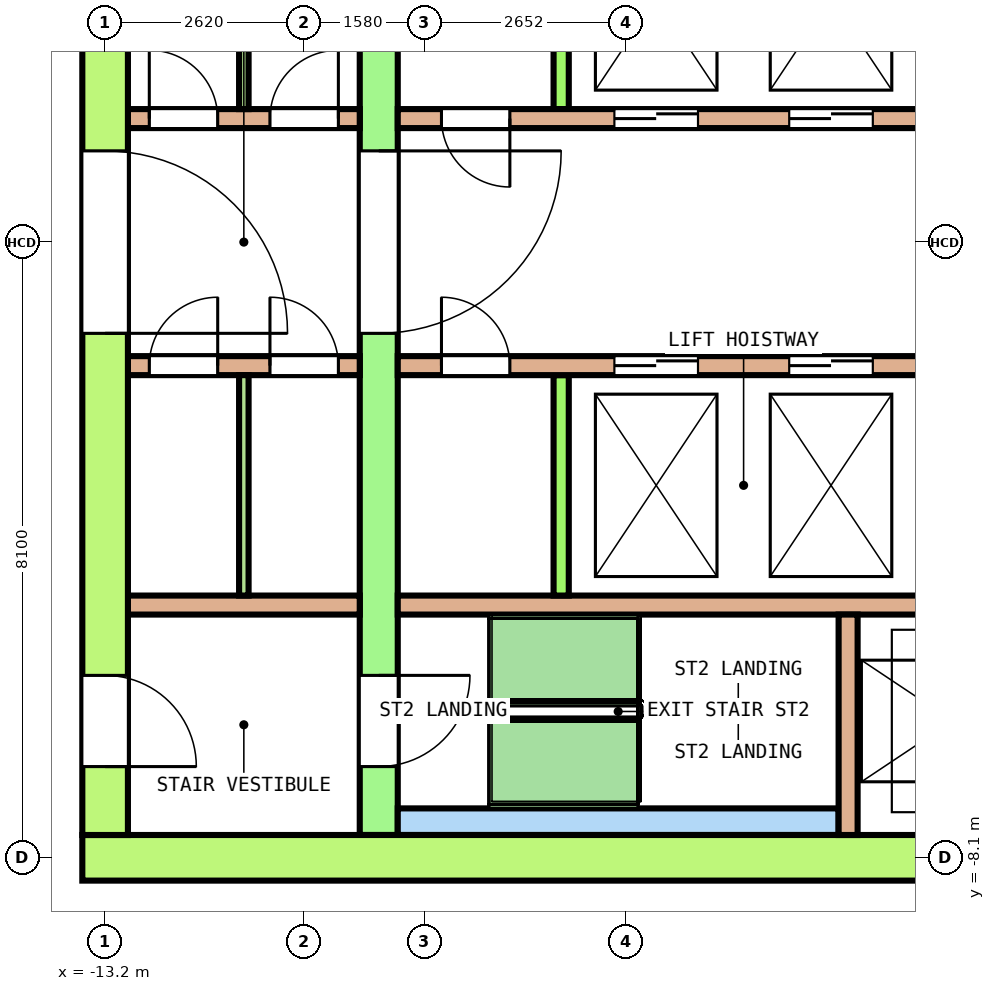
"""IFC4 building model, lengths in metres.
Left out: names, types, materials, properties, quantities, classifications, styles, units other than length and angle.
Written with IfcOpenShell. Run it as: python <this file> out.ifc"""

import sys

from ifc_helpers import new_model, si_unit, direction, frame, frame_2d, origin, place, context, subcontext, project, spatial, rectangle, extrude, element, fill, save


model = new_model("IFC4")
c1 = context("Model", 3, precision=1e-05, world=origin(), true_north=direction((0.0, 1.0)))
c2 = subcontext(c1, "Body", "Model", "MODEL_VIEW")
j1 = project(units=[si_unit("LENGTHUNIT", "METRE"), si_unit("PLANEANGLEUNIT", "RADIAN")], contexts=[c1])
p1 = place(None, origin())
s1 = spatial("IfcSite", under=j1, at=p1, CompositionType="ELEMENT")
p2 = place(p1, origin())
s2 = spatial("IfcBuilding", under=s1, at=p2, CompositionType="ELEMENT")
p3 = place(p2, frame((0.0, 0.0, 231.4)))
s3 = spatial("IfcBuildingStorey", under=s2, at=p3, CompositionType="ELEMENT", Elevation=231.4)
p4 = place(p3, frame((-13.5, -8.1, 0.0), z_axis=(0.0, 0.0, 1.0), x_axis=(1.0, 0.0, 0.0)))
e1 = element("IfcWall", 1, at=p4, inside=s3, PredefinedType="SHEAR", context=c2, shape_type="SweptSolid", body=[
    extrude(rectangle(XDim=27.0, YDim=0.6, at=frame_2d((13.5, 0.0))), origin(), (0.0, 0.0, 1.0), 5.7),
])
p5 = place(p4, frame((15.05, 0.0, 0.0)))
e2 = element("IfcOpeningElement", 2, at=p5, cuts=e1, PredefinedType="OPENING", context=c2, shape_type="SweptSolid", body=[
    extrude(rectangle(XDim=1.2, YDim=2.1, at=frame_2d((0.6, 1.05))), frame((0.0, 0.31, 0.0), z_axis=(0.0, -1.0, 0.0), x_axis=(1.0, 0.0, 0.0)), (0.0, 0.0, 1.0), 0.62),
])
p6 = place(p3, frame((-13.2, -7.8, 0.0), z_axis=(0.0, 0.0, 1.0), x_axis=(0.0, 1.0, 0.0)))
e3 = element("IfcWall", 3, at=p6, inside=s3, PredefinedType="SHEAR", context=c2, shape_type="SweptSolid", body=[
    extrude(rectangle(XDim=15.6, YDim=0.6, at=frame_2d((7.8, 0.0))), origin(), (0.0, 0.0, 1.0), 5.7),
])
p7 = place(p6, frame((6.6, 0.0, 0.0)))
e4 = element("IfcOpeningElement", 4, at=p7, cuts=e3, PredefinedType="OPENING", context=c2, shape_type="SweptSolid", body=[
    extrude(rectangle(XDim=2.4, YDim=2.1, at=frame_2d((1.2, 1.05))), frame((0.0, 0.31, 0.0), z_axis=(0.0, -1.0, 0.0), x_axis=(1.0, 0.0, 0.0)), (0.0, 0.0, 1.0), 0.62),
])
p8 = place(p6, frame((13.5, 0.0, 0.0)))
e5 = element("IfcOpeningElement", 5, at=p8, cuts=e3, PredefinedType="OPENING", context=c2, shape_type="SweptSolid", body=[
    extrude(rectangle(XDim=1.2, YDim=2.1, at=frame_2d((0.6, 1.05))), frame((0.0, 0.31, 0.0), z_axis=(0.0, -1.0, 0.0), x_axis=(1.0, 0.0, 0.0)), (0.0, 0.0, 1.0), 0.62),
])
p9 = place(p6, frame((0.9, 0.0, 0.0)))
e6 = element("IfcOpeningElement", 6, at=p9, cuts=e3, PredefinedType="OPENING", context=c2, shape_type="SweptSolid", body=[
    extrude(rectangle(XDim=1.2, YDim=2.1, at=frame_2d((0.6, 1.05))), frame((0.0, 0.31, 0.0), z_axis=(0.0, -1.0, 0.0), x_axis=(1.0, 0.0, 0.0)), (0.0, 0.0, 1.0), 0.62),
])
p10 = place(p3, frame((-9.6, -7.8, 0.0), z_axis=(0.0, 0.0, 1.0), x_axis=(0.0, 1.0, 0.0)))
e7 = element("IfcWall", 7, at=p10, inside=s3, PredefinedType="SHEAR", context=c2, shape_type="SweptSolid", body=[
    extrude(rectangle(XDim=15.6, YDim=0.5, at=frame_2d((7.8, 0.0))), origin(), (0.0, 0.0, 1.0), 5.7),
])
p11 = place(p10, frame((6.6, 0.0, 0.0)))
e8 = element("IfcOpeningElement", 8, at=p11, cuts=e7, PredefinedType="OPENING", context=c2, shape_type="SweptSolid", body=[
    extrude(rectangle(XDim=2.4, YDim=2.1, at=frame_2d((1.2, 1.05))), frame((0.0, 0.26, 0.0), z_axis=(0.0, -1.0, 0.0), x_axis=(1.0, 0.0, 0.0)), (0.0, 0.0, 1.0), 0.52),
])
p12 = place(p10, frame((13.5, 0.0, 0.0)))
e9 = element("IfcOpeningElement", 9, at=p12, cuts=e7, PredefinedType="OPENING", context=c2, shape_type="SweptSolid", body=[
    extrude(rectangle(XDim=1.2, YDim=2.1, at=frame_2d((0.6, 1.05))), frame((0.0, 0.26, 0.0), z_axis=(0.0, -1.0, 0.0), x_axis=(1.0, 0.0, 0.0)), (0.0, 0.0, 1.0), 0.52),
])
p13 = place(p10, frame((0.9, 0.0, 0.0)))
e10 = element("IfcOpeningElement", 10, at=p13, cuts=e7, PredefinedType="OPENING", context=c2, shape_type="SweptSolid", body=[
    extrude(rectangle(XDim=1.2, YDim=2.1, at=frame_2d((0.6, 1.05))), frame((0.0, 0.26, 0.0), z_axis=(0.0, -1.0, 0.0), x_axis=(1.0, 0.0, 0.0)), (0.0, 0.0, 1.0), 0.52),
])
p14 = place(p3, frame((-12.9, 1.625, 0.0), z_axis=(0.0, 0.0, 1.0), x_axis=(1.0, 0.0, 0.0)))
e11 = element("IfcWall", 11, at=p14, inside=s3, PredefinedType="SOLIDWALL", context=c2, shape_type="SweptSolid", body=[
    extrude(rectangle(XDim=3.05, YDim=0.25, at=frame_2d((1.525, 0.0))), origin(), (0.0, 0.0, 1.0), 5.7),
])
p15 = place(p14, frame((0.281, 0.0, 0.0)))
e12 = element("IfcOpeningElement", 12, at=p15, cuts=e11, PredefinedType="OPENING", context=c2, shape_type="SweptSolid", body=[
    extrude(rectangle(XDim=0.9, YDim=2.1, at=frame_2d((0.45, 1.05))), frame((0.0, 0.135, 0.0), z_axis=(0.0, -1.0, 0.0), x_axis=(1.0, 0.0, 0.0)), (0.0, 0.0, 1.0), 0.27),
])
p16 = place(p14, frame((1.869, 0.0, 0.0)))
e13 = element("IfcOpeningElement", 13, at=p16, cuts=e11, PredefinedType="OPENING", context=c2, shape_type="SweptSolid", body=[
    extrude(rectangle(XDim=0.9, YDim=2.1, at=frame_2d((0.45, 1.05))), frame((0.0, 0.135, 0.0), z_axis=(0.0, -1.0, 0.0), x_axis=(1.0, 0.0, 0.0)), (0.0, 0.0, 1.0), 0.27),
])
p17 = place(p3, frame((-9.35, 1.625, 0.0), z_axis=(0.0, 0.0, 1.0), x_axis=(1.0, 0.0, 0.0)))
e14 = element("IfcWall", 14, at=p17, inside=s3, PredefinedType="SOLIDWALL", context=c2, shape_type="SweptSolid", body=[
    extrude(rectangle(XDim=18.7, YDim=0.25, at=frame_2d((9.35, 0.0))), origin(), (0.0, 0.0, 1.0), 5.7),
])
p18 = place(p17, frame((2.85, 0.0, 0.0)))
e15 = element("IfcOpeningElement", 15, at=p18, cuts=e14, PredefinedType="OPENING", context=c2, shape_type="SweptSolid", body=[
    extrude(rectangle(XDim=1.1, YDim=2.1, at=frame_2d((0.55, 1.05))), frame((0.0, 0.135, 0.0), z_axis=(0.0, -1.0, 0.0), x_axis=(1.0, 0.0, 0.0)), (0.0, 0.0, 1.0), 0.27),
])
p19 = place(p17, frame((5.15, 0.0, 0.0)))
e16 = element("IfcOpeningElement", 16, at=p19, cuts=e14, PredefinedType="OPENING", context=c2, shape_type="SweptSolid", body=[
    extrude(rectangle(XDim=1.1, YDim=2.1, at=frame_2d((0.55, 1.05))), frame((0.0, 0.135, 0.0), z_axis=(0.0, -1.0, 0.0), x_axis=(1.0, 0.0, 0.0)), (0.0, 0.0, 1.0), 0.27),
])
p20 = place(p17, frame((7.65, 0.0, 0.0)))
e17 = element("IfcOpeningElement", 17, at=p20, cuts=e14, PredefinedType="OPENING", context=c2, shape_type="SweptSolid", body=[
    extrude(rectangle(XDim=1.1, YDim=2.1, at=frame_2d((0.55, 1.05))), frame((0.0, 0.135, 0.0), z_axis=(0.0, -1.0, 0.0), x_axis=(1.0, 0.0, 0.0)), (0.0, 0.0, 1.0), 0.27),
])
p21 = place(p17, frame((9.95, 0.0, 0.0)))
e18 = element("IfcOpeningElement", 18, at=p21, cuts=e14, PredefinedType="OPENING", context=c2, shape_type="SweptSolid", body=[
    extrude(rectangle(XDim=1.1, YDim=2.1, at=frame_2d((0.55, 1.05))), frame((0.0, 0.135, 0.0), z_axis=(0.0, -1.0, 0.0), x_axis=(1.0, 0.0, 0.0)), (0.0, 0.0, 1.0), 0.27),
])
p22 = place(p17, frame((12.4, 0.0, 0.0)))
e19 = element("IfcOpeningElement", 19, at=p22, cuts=e14, PredefinedType="OPENING", context=c2, shape_type="SweptSolid", body=[
    extrude(rectangle(XDim=1.1, YDim=2.1, at=frame_2d((0.55, 1.05))), frame((0.0, 0.135, 0.0), z_axis=(0.0, -1.0, 0.0), x_axis=(1.0, 0.0, 0.0)), (0.0, 0.0, 1.0), 0.27),
])
p23 = place(p17, frame((14.8, 0.0, 0.0)))
e20 = element("IfcOpeningElement", 20, at=p23, cuts=e14, PredefinedType="OPENING", context=c2, shape_type="SweptSolid", body=[
    extrude(rectangle(XDim=1.1, YDim=2.1, at=frame_2d((0.55, 1.05))), frame((0.0, 0.135, 0.0), z_axis=(0.0, -1.0, 0.0), x_axis=(1.0, 0.0, 0.0)), (0.0, 0.0, 1.0), 0.27),
])
p24 = place(p17, frame((0.575, 0.0, 0.0)))
e21 = element("IfcOpeningElement", 21, at=p24, cuts=e14, PredefinedType="OPENING", context=c2, shape_type="SweptSolid", body=[
    extrude(rectangle(XDim=0.9, YDim=2.1, at=frame_2d((0.45, 1.05))), frame((0.0, 0.135, 0.0), z_axis=(0.0, -1.0, 0.0), x_axis=(1.0, 0.0, 0.0)), (0.0, 0.0, 1.0), 0.27),
])
p25 = place(p17, frame((17.225, 0.0, 0.0)))
e22 = element("IfcOpeningElement", 22, at=p25, cuts=e14, PredefinedType="OPENING", context=c2, shape_type="SweptSolid", body=[
    extrude(rectangle(XDim=0.9, YDim=2.1, at=frame_2d((0.45, 1.05))), frame((0.0, 0.135, 0.0), z_axis=(0.0, -1.0, 0.0), x_axis=(1.0, 0.0, 0.0)), (0.0, 0.0, 1.0), 0.27),
])
p26 = place(p3, frame((-7.2, 1.75, 0.0), z_axis=(0.0, 0.0, 1.0), x_axis=(0.0, 1.0, 0.0)))
e23 = element("IfcWall", 23, at=p26, inside=s3, PredefinedType="SOLIDWALL", context=c2, shape_type="SweptSolid", body=[
    extrude(rectangle(XDim=2.9, YDim=0.2, at=frame_2d((1.45, 0.0))), origin(), (0.0, 0.0, 1.0), 5.7),
])
p27 = place(p3, frame((-12.9, -1.625, 0.0), z_axis=(0.0, 0.0, 1.0), x_axis=(1.0, 0.0, 0.0)))
e24 = element("IfcWall", 24, at=p27, inside=s3, PredefinedType="SOLIDWALL", context=c2, shape_type="SweptSolid", body=[
    extrude(rectangle(XDim=3.05, YDim=0.25, at=frame_2d((1.525, 0.0))), origin(), (0.0, 0.0, 1.0), 5.7),
])
p28 = place(p27, frame((0.281, 0.0, 0.0)))
e25 = element("IfcOpeningElement", 25, at=p28, cuts=e24, PredefinedType="OPENING", context=c2, shape_type="SweptSolid", body=[
    extrude(rectangle(XDim=0.9, YDim=2.1, at=frame_2d((0.45, 1.05))), frame((0.0, 0.135, 0.0), z_axis=(0.0, -1.0, 0.0), x_axis=(1.0, 0.0, 0.0)), (0.0, 0.0, 1.0), 0.27),
])
p29 = place(p27, frame((1.869, 0.0, 0.0)))
e26 = element("IfcOpeningElement", 26, at=p29, cuts=e24, PredefinedType="OPENING", context=c2, shape_type="SweptSolid", body=[
    extrude(rectangle(XDim=0.9, YDim=2.1, at=frame_2d((0.45, 1.05))), frame((0.0, 0.135, 0.0), z_axis=(0.0, -1.0, 0.0), x_axis=(1.0, 0.0, 0.0)), (0.0, 0.0, 1.0), 0.27),
])
p30 = place(p3, frame((-9.35, -1.625, 0.0), z_axis=(0.0, 0.0, 1.0), x_axis=(1.0, 0.0, 0.0)))
e27 = element("IfcWall", 27, at=p30, inside=s3, PredefinedType="SOLIDWALL", context=c2, shape_type="SweptSolid", body=[
    extrude(rectangle(XDim=18.7, YDim=0.25, at=frame_2d((9.35, 0.0))), origin(), (0.0, 0.0, 1.0), 5.7),
])
p31 = place(p30, frame((2.85, 0.0, 0.0)))
e28 = element("IfcOpeningElement", 28, at=p31, cuts=e27, PredefinedType="OPENING", context=c2, shape_type="SweptSolid", body=[
    extrude(rectangle(XDim=1.1, YDim=2.1, at=frame_2d((0.55, 1.05))), frame((0.0, 0.135, 0.0), z_axis=(0.0, -1.0, 0.0), x_axis=(1.0, 0.0, 0.0)), (0.0, 0.0, 1.0), 0.27),
])
p32 = place(p30, frame((5.15, 0.0, 0.0)))
e29 = element("IfcOpeningElement", 29, at=p32, cuts=e27, PredefinedType="OPENING", context=c2, shape_type="SweptSolid", body=[
    extrude(rectangle(XDim=1.1, YDim=2.1, at=frame_2d((0.55, 1.05))), frame((0.0, 0.135, 0.0), z_axis=(0.0, -1.0, 0.0), x_axis=(1.0, 0.0, 0.0)), (0.0, 0.0, 1.0), 0.27),
])
p33 = place(p30, frame((7.65, 0.0, 0.0)))
e30 = element("IfcOpeningElement", 30, at=p33, cuts=e27, PredefinedType="OPENING", context=c2, shape_type="SweptSolid", body=[
    extrude(rectangle(XDim=1.1, YDim=2.1, at=frame_2d((0.55, 1.05))), frame((0.0, 0.135, 0.0), z_axis=(0.0, -1.0, 0.0), x_axis=(1.0, 0.0, 0.0)), (0.0, 0.0, 1.0), 0.27),
])
p34 = place(p30, frame((9.95, 0.0, 0.0)))
e31 = element("IfcOpeningElement", 31, at=p34, cuts=e27, PredefinedType="OPENING", context=c2, shape_type="SweptSolid", body=[
    extrude(rectangle(XDim=1.1, YDim=2.1, at=frame_2d((0.55, 1.05))), frame((0.0, 0.135, 0.0), z_axis=(0.0, -1.0, 0.0), x_axis=(1.0, 0.0, 0.0)), (0.0, 0.0, 1.0), 0.27),
])
p35 = place(p30, frame((12.4, 0.0, 0.0)))
e32 = element("IfcOpeningElement", 32, at=p35, cuts=e27, PredefinedType="OPENING", context=c2, shape_type="SweptSolid", body=[
    extrude(rectangle(XDim=1.1, YDim=2.1, at=frame_2d((0.55, 1.05))), frame((0.0, 0.135, 0.0), z_axis=(0.0, -1.0, 0.0), x_axis=(1.0, 0.0, 0.0)), (0.0, 0.0, 1.0), 0.27),
])
p36 = place(p30, frame((14.8, 0.0, 0.0)))
e33 = element("IfcOpeningElement", 33, at=p36, cuts=e27, PredefinedType="OPENING", context=c2, shape_type="SweptSolid", body=[
    extrude(rectangle(XDim=1.1, YDim=2.1, at=frame_2d((0.55, 1.05))), frame((0.0, 0.135, 0.0), z_axis=(0.0, -1.0, 0.0), x_axis=(1.0, 0.0, 0.0)), (0.0, 0.0, 1.0), 0.27),
])
p37 = place(p30, frame((0.575, 0.0, 0.0)))
e34 = element("IfcOpeningElement", 34, at=p37, cuts=e27, PredefinedType="OPENING", context=c2, shape_type="SweptSolid", body=[
    extrude(rectangle(XDim=0.9, YDim=2.1, at=frame_2d((0.45, 1.05))), frame((0.0, 0.135, 0.0), z_axis=(0.0, -1.0, 0.0), x_axis=(1.0, 0.0, 0.0)), (0.0, 0.0, 1.0), 0.27),
])
p38 = place(p30, frame((17.225, 0.0, 0.0)))
e35 = element("IfcOpeningElement", 35, at=p38, cuts=e27, PredefinedType="OPENING", context=c2, shape_type="SweptSolid", body=[
    extrude(rectangle(XDim=0.9, YDim=2.1, at=frame_2d((0.45, 1.05))), frame((0.0, 0.135, 0.0), z_axis=(0.0, -1.0, 0.0), x_axis=(1.0, 0.0, 0.0)), (0.0, 0.0, 1.0), 0.27),
])
p39 = place(p3, frame((-12.9, -4.775, 0.0), z_axis=(0.0, 0.0, 1.0), x_axis=(1.0, 0.0, 0.0)))
e36 = element("IfcWall", 36, at=p39, inside=s3, PredefinedType="SOLIDWALL", context=c2, shape_type="SweptSolid", body=[
    extrude(rectangle(XDim=3.05, YDim=0.25, at=frame_2d((1.525, 0.0))), origin(), (0.0, 0.0, 1.0), 5.7),
])
p40 = place(p3, frame((-9.35, -4.775, 0.0), z_axis=(0.0, 0.0, 1.0), x_axis=(1.0, 0.0, 0.0)))
e37 = element("IfcWall", 37, at=p40, inside=s3, PredefinedType="SOLIDWALL", context=c2, shape_type="SweptSolid", body=[
    extrude(rectangle(XDim=18.7, YDim=0.25, at=frame_2d((9.35, 0.0))), origin(), (0.0, 0.0, 1.0), 5.7),
])
p41 = place(p3, frame((-7.2, -4.65, 0.0), z_axis=(0.0, 0.0, 1.0), x_axis=(0.0, 1.0, 0.0)))
e38 = element("IfcWall", 38, at=p41, inside=s3, PredefinedType="SOLIDWALL", context=c2, shape_type="SweptSolid", body=[
    extrude(rectangle(XDim=2.9, YDim=0.2, at=frame_2d((1.45, 0.0))), origin(), (0.0, 0.0, 1.0), 5.7),
])
p42 = place(p3, frame((-9.35, -7.625, 0.0), z_axis=(0.0, 0.0, 1.0), x_axis=(1.0, 0.0, 0.0)))
e39 = element("IfcWall", 39, at=p42, inside=s3, PredefinedType="SOLIDWALL", context=c2, shape_type="SweptSolid", body=[
    extrude(rectangle(XDim=5.8, YDim=0.35, at=frame_2d((2.9, 0.0))), origin(), (0.0, 0.0, 1.0), 5.7),
])
p43 = place(p3, frame((-3.425, -7.8, 0.0), z_axis=(0.0, 0.0, 1.0), x_axis=(0.0, 1.0, 0.0)))
e40 = element("IfcWall", 40, at=p43, inside=s3, PredefinedType="SOLIDWALL", context=c2, shape_type="SweptSolid", body=[
    extrude(rectangle(XDim=2.9, YDim=0.25, at=frame_2d((1.45, 0.0))), origin(), (0.0, 0.0, 1.0), 5.7),
])
for number, where, z_axis, x_axis in (
    (41, (-11.375, 1.75, 0.0), (0.0, 0.0, 1.0), (0.0, 1.0, 0.0)),
    (42, (-11.375, -4.65, 0.0), (0.0, 0.0, 1.0), (0.0, 1.0, 0.0)),
):
    element("IfcWall", number, at=place(p3, frame(where, z_axis=z_axis, x_axis=x_axis)), inside=s3, PredefinedType="PARTITIONING", context=c2, shape_type="SweptSolid", body=[
        extrude(rectangle(XDim=2.9, YDim=0.125, at=frame_2d((1.45, 0.0))), origin(), (0.0, 0.0, 1.0), 5.7),
    ])
p44 = place(p18, origin())
e43 = element("IfcDoor", 43, at=p44, inside=s3, OperationType="DOUBLE_DOOR_SLIDING", PredefinedType="DOOR", context=c2, shape_type="SweptSolid", body=[
    extrude(rectangle(XDim=1.1, YDim=2.1, at=frame_2d((0.55, 1.05))), frame((0.0, 0.075, 0.0), z_axis=(0.0, -1.0, 0.0), x_axis=(1.0, 0.0, 0.0)), (0.0, 0.0, 1.0), 0.15),
])
fill(e15, e43)
p45 = place(p19, origin())
e44 = element("IfcDoor", 44, at=p45, inside=s3, OperationType="DOUBLE_DOOR_SLIDING", PredefinedType="DOOR", context=c2, shape_type="SweptSolid", body=[
    extrude(rectangle(XDim=1.1, YDim=2.1, at=frame_2d((0.55, 1.05))), frame((0.0, 0.075, 0.0), z_axis=(0.0, -1.0, 0.0), x_axis=(1.0, 0.0, 0.0)), (0.0, 0.0, 1.0), 0.15),
])
fill(e16, e44)
p46 = place(p31, origin())
e45 = element("IfcDoor", 45, at=p46, inside=s3, OperationType="DOUBLE_DOOR_SLIDING", PredefinedType="DOOR", context=c2, shape_type="SweptSolid", body=[
    extrude(rectangle(XDim=1.1, YDim=2.1, at=frame_2d((0.55, 1.05))), frame((0.0, 0.075, 0.0), z_axis=(0.0, -1.0, 0.0), x_axis=(1.0, 0.0, 0.0)), (0.0, 0.0, 1.0), 0.15),
])
fill(e28, e45)
p47 = place(p32, origin())
e46 = element("IfcDoor", 46, at=p47, inside=s3, OperationType="DOUBLE_DOOR_SLIDING", PredefinedType="DOOR", context=c2, shape_type="SweptSolid", body=[
    extrude(rectangle(XDim=1.1, YDim=2.1, at=frame_2d((0.55, 1.05))), frame((0.0, 0.075, 0.0), z_axis=(0.0, -1.0, 0.0), x_axis=(1.0, 0.0, 0.0)), (0.0, 0.0, 1.0), 0.15),
])
fill(e29, e46)
p48 = place(p11, origin())
e47 = element("IfcDoor", 47, at=p48, inside=s3, OperationType="DOUBLE_DOOR_SINGLE_SWING", PredefinedType="DOOR", context=c2, shape_type="SweptSolid", body=[
    extrude(rectangle(XDim=2.4, YDim=2.1, at=frame_2d((1.2, 1.05))), frame((0.0, 0.2, 0.0), z_axis=(0.0, -1.0, 0.0), x_axis=(1.0, 0.0, 0.0)), (0.0, 0.0, 1.0), 0.4),
])
fill(e8, e47)
p49 = place(p7, origin())
e48 = element("IfcDoor", 48, at=p49, inside=s3, OperationType="DOUBLE_DOOR_SINGLE_SWING", PredefinedType="DOOR", context=c2, shape_type="SweptSolid", body=[
    extrude(rectangle(XDim=2.4, YDim=2.1, at=frame_2d((1.2, 1.05))), frame((0.0, 0.25, 0.0), z_axis=(0.0, -1.0, 0.0), x_axis=(1.0, 0.0, 0.0)), (0.0, 0.0, 1.0), 0.5),
])
fill(e4, e48)
p50 = place(p13, origin())
e49 = element("IfcDoor", 49, at=p50, inside=s3, OperationType="SINGLE_SWING_RIGHT", PredefinedType="DOOR", context=c2, shape_type="SweptSolid", body=[
    extrude(rectangle(XDim=1.2, YDim=2.1, at=frame_2d((0.6, 1.05))), frame((0.0, 0.2, 0.0), z_axis=(0.0, -1.0, 0.0), x_axis=(1.0, 0.0, 0.0)), (0.0, 0.0, 1.0), 0.4),
])
fill(e10, e49)
p51 = place(p9, origin())
e50 = element("IfcDoor", 50, at=p51, inside=s3, OperationType="SINGLE_SWING_LEFT", PredefinedType="DOOR", context=c2, shape_type="SweptSolid", body=[
    extrude(rectangle(XDim=1.2, YDim=2.1, at=frame_2d((0.6, 1.05))), frame((0.0, 0.25, 0.0), z_axis=(0.0, -1.0, 0.0), x_axis=(1.0, 0.0, 0.0)), (0.0, 0.0, 1.0), 0.5),
])
fill(e6, e50)
p52 = place(p15, origin())
e51 = element("IfcDoor", 51, at=p52, inside=s3, OperationType="SINGLE_SWING_RIGHT", PredefinedType="DOOR", context=c2, shape_type="SweptSolid", body=[
    extrude(rectangle(XDim=0.9, YDim=2.1, at=frame_2d((0.45, 1.05))), frame((0.0, 0.075, 0.0), z_axis=(0.0, -1.0, 0.0), x_axis=(1.0, 0.0, 0.0)), (0.0, 0.0, 1.0), 0.15),
])
fill(e12, e51)
p53 = place(p16, origin())
e52 = element("IfcDoor", 52, at=p53, inside=s3, OperationType="SINGLE_SWING_LEFT", PredefinedType="DOOR", context=c2, shape_type="SweptSolid", body=[
    extrude(rectangle(XDim=0.9, YDim=2.1, at=frame_2d((0.45, 1.05))), frame((0.0, 0.075, 0.0), z_axis=(0.0, -1.0, 0.0), x_axis=(1.0, 0.0, 0.0)), (0.0, 0.0, 1.0), 0.15),
])
fill(e13, e52)
p54 = place(p24, origin())
e53 = element("IfcDoor", 53, at=p54, inside=s3, OperationType="SINGLE_SWING_RIGHT", PredefinedType="DOOR", context=c2, shape_type="SweptSolid", body=[
    extrude(rectangle(XDim=0.9, YDim=2.1, at=frame_2d((0.45, 1.05))), frame((0.0, 0.075, 0.0), z_axis=(0.0, -1.0, 0.0), x_axis=(1.0, 0.0, 0.0)), (0.0, 0.0, 1.0), 0.15),
])
fill(e21, e53)
p55 = place(p28, origin())
e54 = element("IfcDoor", 54, at=p55, inside=s3, OperationType="SINGLE_SWING_RIGHT", PredefinedType="DOOR", context=c2, shape_type="SweptSolid", body=[
    extrude(rectangle(XDim=0.9, YDim=2.1, at=frame_2d((0.45, 1.05))), frame((0.0, 0.075, 0.0), z_axis=(0.0, -1.0, 0.0), x_axis=(1.0, 0.0, 0.0)), (0.0, 0.0, 1.0), 0.15),
])
fill(e25, e54)
p56 = place(p29, origin())
e55 = element("IfcDoor", 55, at=p56, inside=s3, OperationType="SINGLE_SWING_LEFT", PredefinedType="DOOR", context=c2, shape_type="SweptSolid", body=[
    extrude(rectangle(XDim=0.9, YDim=2.1, at=frame_2d((0.45, 1.05))), frame((0.0, 0.075, 0.0), z_axis=(0.0, -1.0, 0.0), x_axis=(1.0, 0.0, 0.0)), (0.0, 0.0, 1.0), 0.15),
])
fill(e26, e55)
p57 = place(p37, origin())
e56 = element("IfcDoor", 56, at=p57, inside=s3, OperationType="SINGLE_SWING_RIGHT", PredefinedType="DOOR", context=c2, shape_type="SweptSolid", body=[
    extrude(rectangle(XDim=0.9, YDim=2.1, at=frame_2d((0.45, 1.05))), frame((0.0, 0.075, 0.0), z_axis=(0.0, -1.0, 0.0), x_axis=(1.0, 0.0, 0.0)), (0.0, 0.0, 1.0), 0.15),
])
fill(e34, e56)
save(model, sys.argv[1])
